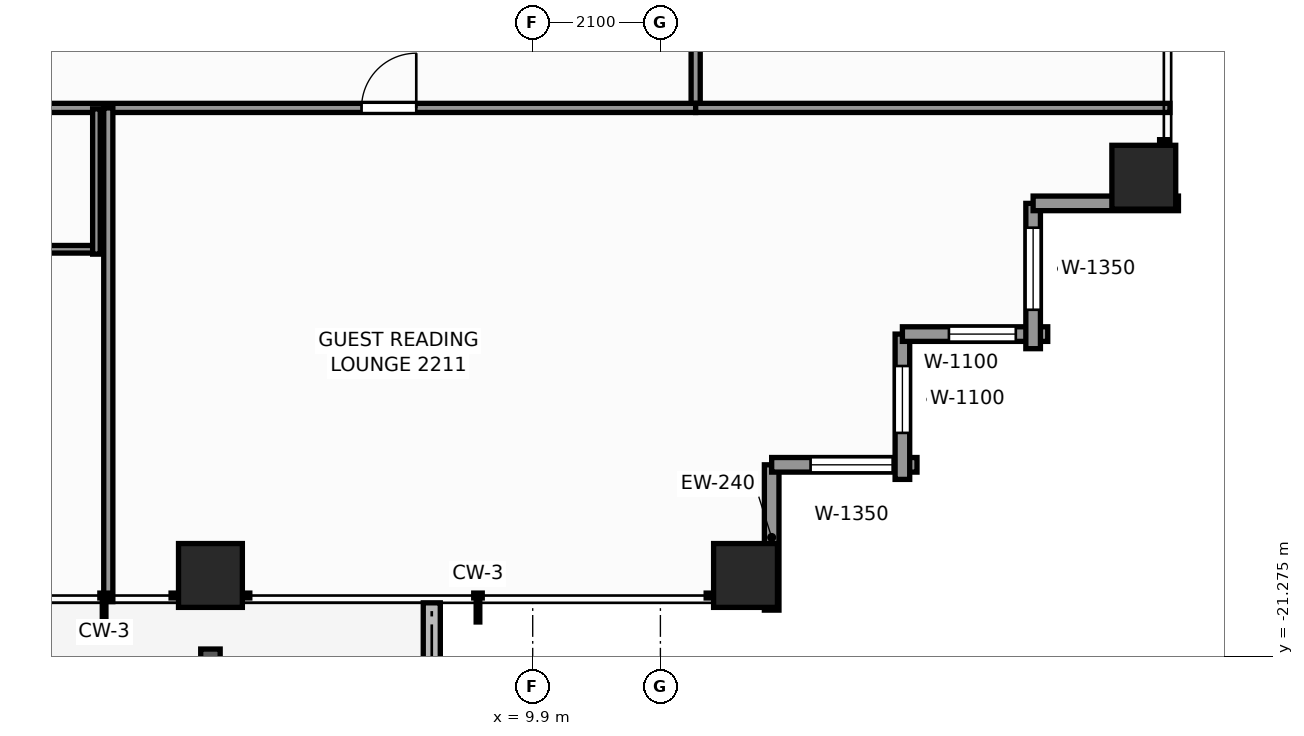
"""IFC4 building model, lengths in metres.
Left out: names, types, materials, properties, quantities, classifications, styles, units other than length and angle.
Written with IfcOpenShell. Run it as: python <this file> out.ifc"""

import sys

from ifc_helpers import new_model, si_unit, direction, frame, frame_2d, origin, origin_2d, place, context, subcontext, project, spatial, rectangle, extrude, element, fill, save


model = new_model("IFC4")
c1 = context("Model", 3, precision=1e-05, world=origin(), true_north=direction((0.0, 1.0)))
c2 = subcontext(c1, "Body", "Model", "MODEL_VIEW")
j1 = project(units=[si_unit("LENGTHUNIT", "METRE"), si_unit("PLANEANGLEUNIT", "RADIAN")], contexts=[c1])
p1 = place(None, origin())
s1 = spatial("IfcSite", under=j1, at=p1, CompositionType="ELEMENT")
p2 = place(p1, origin())
s2 = spatial("IfcBuilding", under=s1, at=p2, CompositionType="ELEMENT")
p3 = place(p2, frame((0.0, 0.0, 78.8)))
s3 = spatial("IfcBuildingStorey", under=s2, at=p3, CompositionType="ELEMENT", Elevation=78.8)
for number, where, z_axis, x_axis in (
    (1, (4.6, -19.95, 0.0), (0.0, 0.0, 1.0), (1.0, 0.0, 0.0)),
    (2, (13.4, -19.95, 0.0), (0.0, 0.0, 1.0), (1.0, 0.0, 0.0)),
    (3, (19.95, -13.4, 0.0), (0.0, 0.0, 1.0), (1.0, 0.0, 0.0)),
):
    element("IfcColumn", number, at=place(p3, frame(where, z_axis=z_axis, x_axis=x_axis)), inside=s3, PredefinedType="COLUMN", context=c2, shape_type="SweptSolid", body=[
        extrude(rectangle(XDim=1.05, YDim=1.05, at=origin_2d()), origin(), (0.0, 0.0, 1.0), 3.3),
    ])
p4 = place(p3, frame((8.24, -23.074, -0.04), z_axis=(0.0, 0.0, 1.0), x_axis=(0.0, 1.0, 0.0)))
e4 = element("IfcWall", 4, at=p4, inside=s3, PredefinedType="PARAPET", context=c2, shape_type="SweptSolid", body=[
    extrude(rectangle(XDim=2.674, YDim=0.28, at=frame_2d((1.337, 0.0))), origin(), (0.0, 0.0, 1.0), 0.42),
])
p5 = place(p3, frame((13.83, -18.13, 0.0), z_axis=(0.0, 0.0, 1.0), x_axis=(0.0, -1.0, 0.0)))
e5 = element("IfcWall", 5, at=p5, inside=s3, PredefinedType="STANDARD", context=c2, shape_type="SweptSolid", body=[
    extrude(rectangle(XDim=2.39, YDim=0.24, at=frame_2d((1.195, 0.0))), origin(), (0.0, 0.0, 1.0), 2.459),
])
p6 = place(p3, frame((16.22, -18.13, 0.0), z_axis=(0.0, 0.0, 1.0), x_axis=(-1.0, 0.0, 0.0)))
e6 = element("IfcWall", 6, at=p6, inside=s3, PredefinedType="STANDARD", context=c2, shape_type="SweptSolid", body=[
    extrude(rectangle(XDim=2.39, YDim=0.24, at=frame_2d((1.195, 0.0))), origin(), (0.0, 0.0, 1.0), 2.459),
])
p7 = place(p6, frame((0.4, 0.0, 0.65)))
e7 = element("IfcOpeningElement", 7, at=p7, cuts=e6, PredefinedType="OPENING", context=c2, shape_type="SweptSolid", body=[
    extrude(rectangle(XDim=1.35, YDim=1.55, at=frame_2d((0.675, 0.775))), frame((0.0, 0.13, 0.0), z_axis=(0.0, -1.0, 0.0), x_axis=(1.0, 0.0, 0.0)), (0.0, 0.0, 1.0), 0.26),
])
p8 = place(p3, frame((15.98, -15.98, 0.0), z_axis=(0.0, 0.0, 1.0), x_axis=(0.0, -1.0, 0.0)))
e8 = element("IfcWall", 8, at=p8, inside=s3, PredefinedType="STANDARD", context=c2, shape_type="SweptSolid", body=[
    extrude(rectangle(XDim=2.39, YDim=0.24, at=frame_2d((1.195, 0.0))), origin(), (0.0, 0.0, 1.0), 2.459),
])
p9 = place(p8, frame((0.525, 0.0, 0.65)))
e9 = element("IfcOpeningElement", 9, at=p9, cuts=e8, PredefinedType="OPENING", context=c2, shape_type="SweptSolid", body=[
    extrude(rectangle(XDim=1.1, YDim=1.45, at=frame_2d((0.55, 0.725))), frame((0.0, 0.13, 0.0), z_axis=(0.0, -1.0, 0.0), x_axis=(1.0, 0.0, 0.0)), (0.0, 0.0, 1.0), 0.26),
])
p10 = place(p3, frame((18.37, -15.98, 0.0), z_axis=(0.0, 0.0, 1.0), x_axis=(-1.0, 0.0, 0.0)))
e10 = element("IfcWall", 10, at=p10, inside=s3, PredefinedType="STANDARD", context=c2, shape_type="SweptSolid", body=[
    extrude(rectangle(XDim=2.39, YDim=0.24, at=frame_2d((1.195, 0.0))), origin(), (0.0, 0.0, 1.0), 2.459),
])
p11 = place(p10, frame((0.525, 0.0, 0.65)))
e11 = element("IfcOpeningElement", 11, at=p11, cuts=e10, PredefinedType="OPENING", context=c2, shape_type="SweptSolid", body=[
    extrude(rectangle(XDim=1.1, YDim=1.45, at=frame_2d((0.55, 0.725))), frame((0.0, 0.13, 0.0), z_axis=(0.0, -1.0, 0.0), x_axis=(1.0, 0.0, 0.0)), (0.0, 0.0, 1.0), 0.26),
])
p12 = place(p3, frame((18.13, -13.83, 0.0), z_axis=(0.0, 0.0, 1.0), x_axis=(0.0, -1.0, 0.0)))
e12 = element("IfcWall", 12, at=p12, inside=s3, PredefinedType="STANDARD", context=c2, shape_type="SweptSolid", body=[
    extrude(rectangle(XDim=2.39, YDim=0.24, at=frame_2d((1.195, 0.0))), origin(), (0.0, 0.0, 1.0), 2.459),
])
p13 = place(p12, frame((0.4, 0.0, 0.65)))
e13 = element("IfcOpeningElement", 13, at=p13, cuts=e12, PredefinedType="OPENING", context=c2, shape_type="SweptSolid", body=[
    extrude(rectangle(XDim=1.35, YDim=1.55, at=frame_2d((0.675, 0.775))), frame((0.0, 0.13, 0.0), z_axis=(0.0, -1.0, 0.0), x_axis=(1.0, 0.0, 0.0)), (0.0, 0.0, 1.0), 0.26),
])
p14 = place(p3, frame((20.52, -13.83, 0.0), z_axis=(0.0, 0.0, 1.0), x_axis=(-1.0, 0.0, 0.0)))
e14 = element("IfcWall", 14, at=p14, inside=s3, PredefinedType="STANDARD", context=c2, shape_type="SweptSolid", body=[
    extrude(rectangle(XDim=2.39, YDim=0.24, at=frame_2d((1.195, 0.0))), origin(), (0.0, 0.0, 1.0), 2.459),
])
p15 = place(p3, frame((12.58, -12.26, 0.0), z_axis=(0.0, 0.0, 1.0), x_axis=(0.0, 1.0, 0.0)))
e15 = element("IfcWall", 15, at=p15, inside=s3, PredefinedType="PARTITIONING", context=c2, shape_type="SweptSolid", body=[
    extrude(rectangle(XDim=24.84, YDim=0.15, at=frame_2d((12.42, 0.0))), origin(), (0.0, 0.0, 1.0), 2.292),
])
p16 = place(p15, frame((4.275, 0.0, 0.0)))
e16 = element("IfcOpeningElement", 16, at=p16, cuts=e15, PredefinedType="OPENING", context=c2, shape_type="SweptSolid", body=[
    extrude(rectangle(XDim=0.9, YDim=2.06, at=frame_2d((0.45, 1.03))), frame((0.0, 0.085, 0.0), z_axis=(0.0, -1.0, 0.0), x_axis=(1.0, 0.0, 0.0)), (0.0, 0.0, 1.0), 0.17),
])
p17 = place(p15, frame((13.059, 0.0, 0.0)))
e17 = element("IfcOpeningElement", 17, at=p17, cuts=e15, PredefinedType="OPENING", context=c2, shape_type="SweptSolid", body=[
    extrude(rectangle(XDim=0.95, YDim=2.06, at=frame_2d((0.475, 1.03))), frame((0.0, 0.085, 0.0), z_axis=(0.0, -1.0, 0.0), x_axis=(1.0, 0.0, 0.0)), (0.0, 0.0, 1.0), 0.17),
])
p18 = place(p15, frame((19.508, 0.0, 0.0)))
e18 = element("IfcOpeningElement", 18, at=p18, cuts=e15, PredefinedType="OPENING", context=c2, shape_type="SweptSolid", body=[
    extrude(rectangle(XDim=0.95, YDim=2.06, at=frame_2d((0.475, 1.03))), frame((0.0, 0.085, 0.0), z_axis=(0.0, -1.0, 0.0), x_axis=(1.0, 0.0, 0.0)), (0.0, 0.0, 1.0), 0.17),
])
p19 = place(p3, frame((-3.65, -12.26, 0.0), z_axis=(0.0, 0.0, 1.0), x_axis=(1.0, 0.0, 0.0)))
e19 = element("IfcWall", 19, at=p19, inside=s3, PredefinedType="PARTITIONING", context=c2, shape_type="SweptSolid", body=[
    extrude(rectangle(XDim=16.23, YDim=0.15, at=frame_2d((8.115, 0.0))), origin(), (0.0, 0.0, 1.0), 2.292),
])
p20 = place(p19, frame((1.397, 0.0, 0.0)))
e20 = element("IfcOpeningElement", 20, at=p20, cuts=e19, PredefinedType="OPENING", context=c2, shape_type="SweptSolid", body=[
    extrude(rectangle(XDim=0.95, YDim=2.06, at=frame_2d((0.475, 1.03))), frame((0.0, 0.085, 0.0), z_axis=(0.0, -1.0, 0.0), x_axis=(1.0, 0.0, 0.0)), (0.0, 0.0, 1.0), 0.17),
])
p21 = place(p19, frame((10.735, 0.0, 0.0)))
e21 = element("IfcOpeningElement", 21, at=p21, cuts=e19, PredefinedType="OPENING", context=c2, shape_type="SweptSolid", body=[
    extrude(rectangle(XDim=0.9, YDim=2.06, at=frame_2d((0.45, 1.03))), frame((0.0, 0.085, 0.0), z_axis=(0.0, -1.0, 0.0), x_axis=(1.0, 0.0, 0.0)), (0.0, 0.0, 1.0), 0.17),
])
p22 = place(p3, frame((12.58, -12.26, 0.0), z_axis=(0.0, 0.0, 1.0), x_axis=(1.0, 0.0, 0.0)))
e22 = element("IfcWall", 22, at=p22, inside=s3, PredefinedType="PARTITIONING", context=c2, shape_type="SweptSolid", body=[
    extrude(rectangle(XDim=7.8, YDim=0.15, at=frame_2d((3.9, 0.0))), origin(), (0.0, 0.0, 1.0), 2.292),
])
p23 = place(p3, frame((2.92, -20.38, 0.0), z_axis=(0.0, 0.0, 1.0), x_axis=(0.0, 1.0, 0.0)))
e23 = element("IfcWall", 23, at=p23, inside=s3, PredefinedType="PARTITIONING", context=c2, shape_type="SweptSolid", body=[
    extrude(rectangle(XDim=8.12, YDim=0.15, at=frame_2d((4.06, 0.0))), origin(), (0.0, 0.0, 1.0), 2.449),
])
p24 = place(p3, frame((0.015, -14.585, 0.0), z_axis=(0.0, 0.0, 1.0), x_axis=(1.0, 0.0, 0.0)))
e24 = element("IfcWall", 24, at=p24, inside=s3, PredefinedType="PARTITIONING", context=c2, shape_type="SweptSolid", body=[
    extrude(rectangle(XDim=2.77, YDim=0.125, at=frame_2d((1.385, 0.0))), origin(), (0.0, 0.0, 1.0), 2.605),
])
p25 = place(p3, frame((2.725, -14.665, 0.0), z_axis=(0.0, 0.0, 1.0), x_axis=(0.0, 1.0, 0.0)))
e25 = element("IfcWall", 25, at=p25, inside=s3, PredefinedType="PARTITIONING", context=c2, shape_type="SweptSolid", body=[
    extrude(rectangle(XDim=2.39, YDim=0.125, at=frame_2d((1.195, 0.0))), origin(), (0.0, 0.0, 1.0), 3.08),
])
p26 = place(p7, origin())
e26 = element("IfcWindow", 26, at=p26, inside=s3, PartitioningType="SINGLE_PANEL", PredefinedType="WINDOW", context=c2, shape_type="SweptSolid", body=[
    extrude(rectangle(XDim=1.35, YDim=1.55, at=frame_2d((0.675, 0.775))), frame((0.0, 0.03, 0.0), z_axis=(0.0, -1.0, 0.0), x_axis=(1.0, 0.0, 0.0)), (0.0, 0.0, 1.0), 0.06),
])
fill(e7, e26)
p27 = place(p9, origin())
e27 = element("IfcWindow", 27, at=p27, inside=s3, PartitioningType="SINGLE_PANEL", PredefinedType="WINDOW", context=c2, shape_type="SweptSolid", body=[
    extrude(rectangle(XDim=1.1, YDim=1.45, at=frame_2d((0.55, 0.725))), frame((0.0, 0.03, 0.0), z_axis=(0.0, -1.0, 0.0), x_axis=(1.0, 0.0, 0.0)), (0.0, 0.0, 1.0), 0.06),
])
fill(e9, e27)
p28 = place(p11, origin())
e28 = element("IfcWindow", 28, at=p28, inside=s3, PartitioningType="SINGLE_PANEL", PredefinedType="WINDOW", context=c2, shape_type="SweptSolid", body=[
    extrude(rectangle(XDim=1.1, YDim=1.45, at=frame_2d((0.55, 0.725))), frame((0.0, 0.03, 0.0), z_axis=(0.0, -1.0, 0.0), x_axis=(1.0, 0.0, 0.0)), (0.0, 0.0, 1.0), 0.06),
])
fill(e11, e28)
p29 = place(p13, origin())
e29 = element("IfcWindow", 29, at=p29, inside=s3, PartitioningType="SINGLE_PANEL", PredefinedType="WINDOW", context=c2, shape_type="SweptSolid", body=[
    extrude(rectangle(XDim=1.35, YDim=1.55, at=frame_2d((0.675, 0.775))), frame((0.0, 0.03, 0.0), z_axis=(0.0, -1.0, 0.0), x_axis=(1.0, 0.0, 0.0)), (0.0, 0.0, 1.0), 0.06),
])
fill(e13, e29)
p30 = place(p21, origin())
e30 = element("IfcDoor", 30, at=p30, inside=s3, OperationType="SINGLE_SWING_RIGHT", PredefinedType="DOOR", context=c2, shape_type="SweptSolid", body=[
    extrude(rectangle(XDim=0.9, YDim=2.06, at=frame_2d((0.45, 1.03))), frame((0.0, 0.025, 0.0), z_axis=(0.0, -1.0, 0.0), x_axis=(1.0, 0.0, 0.0)), (0.0, 0.0, 1.0), 0.05),
])
fill(e21, e30)
save(model, sys.argv[1])
